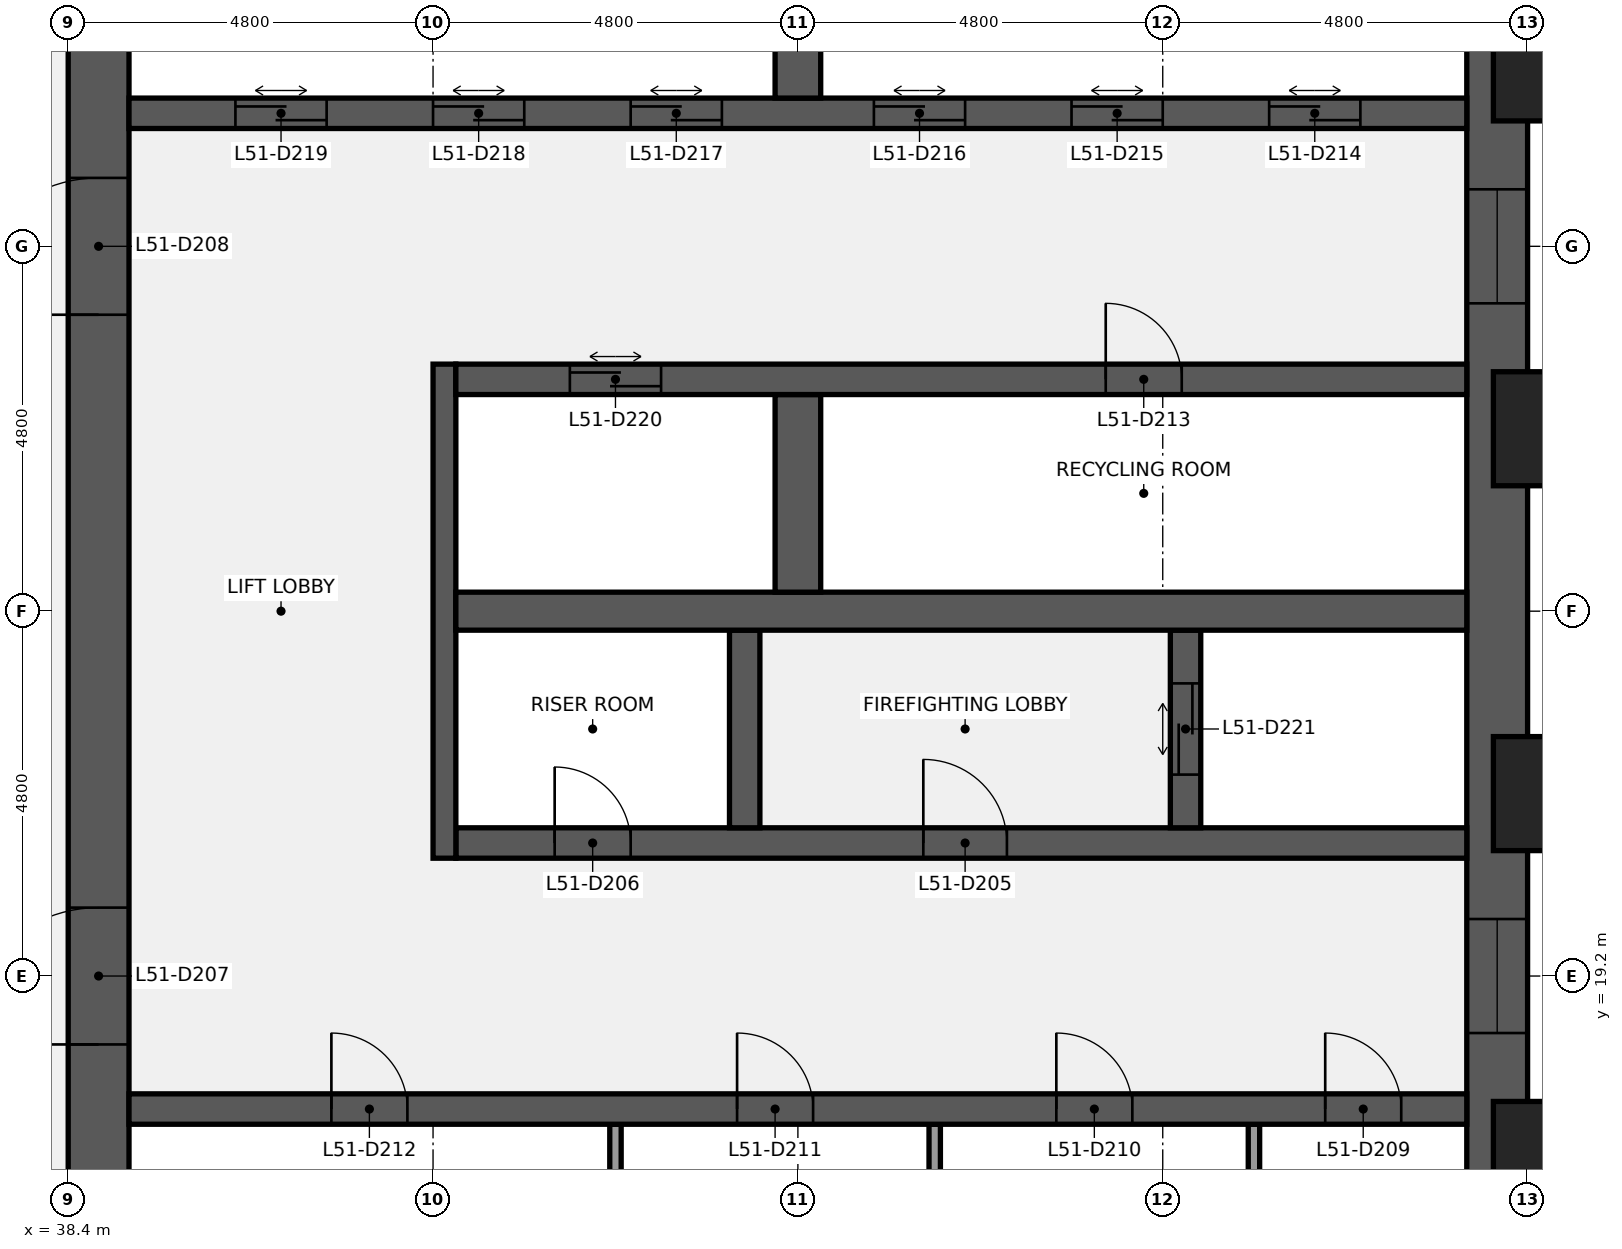
"""IFC4 building model, lengths in metres.
Left out: names, types, materials, properties, quantities, classifications, styles, units other than length and angle.
Written with IfcOpenShell. Run it as: python <this file> out.ifc"""

import sys

from ifc_helpers import new_model, si_unit, direction, frame, frame_2d, origin, origin_2d, place, context, subcontext, project, spatial, rectangle, extrude, element, fill, save


model = new_model("IFC4")
c1 = context("Model", 3, precision=1e-05, world=origin(), true_north=direction((0.0, 1.0)))
c2 = subcontext(c1, "Body", "Model", "MODEL_VIEW")
j1 = project(units=[si_unit("LENGTHUNIT", "METRE"), si_unit("PLANEANGLEUNIT", "RADIAN")], contexts=[c1])
p1 = place(None, origin())
s1 = spatial("IfcSite", under=j1, at=p1, CompositionType="ELEMENT")
p2 = place(p1, origin())
s2 = spatial("IfcBuilding", under=s1, at=p2, CompositionType="ELEMENT")
p3 = place(p2, frame((0.0, 0.0, 233.2)))
s3 = spatial("IfcBuildingStorey", under=s2, at=p3, CompositionType="ELEMENT", Elevation=233.2)
p4 = place(p3, frame((57.2, 38.4, 0.0), z_axis=(0.0, 0.0, 1.0), x_axis=(0.0, -1.0, 0.0)))
e1 = element("IfcWall", 1, at=p4, inside=s3, PredefinedType="SHEAR", context=c2, shape_type="SweptSolid", body=[
    extrude(rectangle(XDim=28.8, YDim=0.8, at=frame_2d((14.4, 0.0))), origin(), (0.0, 0.0, 1.0), 3.84),
])
p5 = place(p4, frame((18.45, 0.0, 0.9)))
e2 = element("IfcOpeningElement", 2, at=p5, cuts=e1, PredefinedType="OPENING", context=c2, shape_type="SweptSolid", body=[
    extrude(rectangle(XDim=1.5, YDim=1.5, at=frame_2d((0.75, 0.75))), frame((0.0, 0.41, 0.0), z_axis=(0.0, -1.0, 0.0), x_axis=(1.0, 0.0, 0.0)), (0.0, 0.0, 1.0), 0.82),
])
p6 = place(p4, frame((8.85, 0.0, 0.9)))
e3 = element("IfcOpeningElement", 3, at=p6, cuts=e1, PredefinedType="OPENING", context=c2, shape_type="SweptSolid", body=[
    extrude(rectangle(XDim=1.5, YDim=1.5, at=frame_2d((0.75, 0.75))), frame((0.0, 0.41, 0.0), z_axis=(0.0, -1.0, 0.0), x_axis=(1.0, 0.0, 0.0)), (0.0, 0.0, 1.0), 0.82),
])
p7 = place(p3, frame((38.8, 9.6, 0.0), z_axis=(0.0, 0.0, 1.0), x_axis=(0.0, 1.0, 0.0)))
e4 = element("IfcWall", 4, at=p7, inside=s3, PredefinedType="SHEAR", context=c2, shape_type="SweptSolid", body=[
    extrude(rectangle(XDim=28.8, YDim=0.8, at=frame_2d((14.4, 0.0))), origin(), (0.0, 0.0, 1.0), 3.84),
])
p8 = place(p7, frame((8.7, 0.0, 0.0)))
e5 = element("IfcOpeningElement", 5, at=p8, cuts=e4, PredefinedType="OPENING", context=c2, shape_type="SweptSolid", body=[
    extrude(rectangle(XDim=1.8, YDim=2.1, at=frame_2d((0.9, 1.05))), frame((0.0, 0.41, 0.0), z_axis=(0.0, -1.0, 0.0), x_axis=(1.0, 0.0, 0.0)), (0.0, 0.0, 1.0), 0.82),
])
p9 = place(p7, frame((18.3, 0.0, 0.0)))
e6 = element("IfcOpeningElement", 6, at=p9, cuts=e4, PredefinedType="OPENING", context=c2, shape_type="SweptSolid", body=[
    extrude(rectangle(XDim=1.8, YDim=2.1, at=frame_2d((0.9, 1.05))), frame((0.0, 0.41, 0.0), z_axis=(0.0, -1.0, 0.0), x_axis=(1.0, 0.0, 0.0)), (0.0, 0.0, 1.0), 0.82),
])
for number, where, z_axis, x_axis in (
    (7, (54.0, 14.65, 0.0), (0.0, 0.0, 1.0), (0.0, 1.0, 0.0)),
    (8, (49.8, 14.65, 0.0), (0.0, 0.0, 1.0), (0.0, 1.0, 0.0)),
    (9, (45.6, 14.65, 0.0), (0.0, 0.0, 1.0), (0.0, 1.0, 0.0)),
):
    element("IfcWall", number, at=place(p3, frame(where, z_axis=z_axis, x_axis=x_axis)), inside=s3, PredefinedType="PARTITIONING", context=c2, shape_type="SweptSolid", body=[
        extrude(rectangle(XDim=2.6, YDim=0.15, at=frame_2d((1.3, 0.0))), origin(), (0.0, 0.0, 1.0), 3.84),
    ])
p10 = place(p3, frame((39.2, 17.45, 0.0), z_axis=(0.0, 0.0, 1.0), x_axis=(1.0, 0.0, 0.0)))
e10 = element("IfcWall", 10, at=p10, inside=s3, PredefinedType="SHEAR", context=c2, shape_type="SweptSolid", body=[
    extrude(rectangle(XDim=17.6, YDim=0.4, at=frame_2d((8.8, 0.0))), origin(), (0.0, 0.0, 1.0), 3.84),
])
p11 = place(p10, frame((15.738, 0.0, 0.0)))
e11 = element("IfcOpeningElement", 11, at=p11, cuts=e10, PredefinedType="OPENING", context=c2, shape_type="SweptSolid", body=[
    extrude(rectangle(XDim=1.0, YDim=2.1, at=frame_2d((0.5, 1.05))), frame((0.0, 0.21, 0.0), z_axis=(0.0, -1.0, 0.0), x_axis=(1.0, 0.0, 0.0)), (0.0, 0.0, 1.0), 0.42),
])
p12 = place(p10, frame((12.2, 0.0, 0.0)))
e12 = element("IfcOpeningElement", 12, at=p12, cuts=e10, PredefinedType="OPENING", context=c2, shape_type="SweptSolid", body=[
    extrude(rectangle(XDim=1.0, YDim=2.1, at=frame_2d((0.5, 1.05))), frame((0.0, 0.21, 0.0), z_axis=(0.0, -1.0, 0.0), x_axis=(1.0, 0.0, 0.0)), (0.0, 0.0, 1.0), 0.42),
])
p13 = place(p10, frame((8.0, 0.0, 0.0)))
e13 = element("IfcOpeningElement", 13, at=p13, cuts=e10, PredefinedType="OPENING", context=c2, shape_type="SweptSolid", body=[
    extrude(rectangle(XDim=1.0, YDim=2.1, at=frame_2d((0.5, 1.05))), frame((0.0, 0.21, 0.0), z_axis=(0.0, -1.0, 0.0), x_axis=(1.0, 0.0, 0.0)), (0.0, 0.0, 1.0), 0.42),
])
p14 = place(p10, frame((2.663, 0.0, 0.0)))
e14 = element("IfcOpeningElement", 14, at=p14, cuts=e10, PredefinedType="OPENING", context=c2, shape_type="SweptSolid", body=[
    extrude(rectangle(XDim=1.0, YDim=2.1, at=frame_2d((0.5, 1.05))), frame((0.0, 0.21, 0.0), z_axis=(0.0, -1.0, 0.0), x_axis=(1.0, 0.0, 0.0)), (0.0, 0.0, 1.0), 0.42),
])
p15 = place(p3, frame((43.5, 20.95, 0.0), z_axis=(0.0, 0.0, 1.0), x_axis=(1.0, 0.0, 0.0)))
e15 = element("IfcWall", 15, at=p15, inside=s3, PredefinedType="SHEAR", context=c2, shape_type="SweptSolid", body=[
    extrude(rectangle(XDim=13.3, YDim=0.4, at=frame_2d((6.65, 0.0))), origin(), (0.0, 0.0, 1.0), 3.84),
])
p16 = place(p15, frame((6.15, 0.0, 0.0)))
e16 = element("IfcOpeningElement", 16, at=p16, cuts=e15, PredefinedType="OPENING", context=c2, shape_type="SweptSolid", body=[
    extrude(rectangle(XDim=1.1, YDim=2.1, at=frame_2d((0.55, 1.05))), frame((0.0, 0.21, 0.0), z_axis=(0.0, -1.0, 0.0), x_axis=(1.0, 0.0, 0.0)), (0.0, 0.0, 1.0), 0.42),
])
p17 = place(p15, frame((1.3, 0.0, 0.0)))
e17 = element("IfcOpeningElement", 17, at=p17, cuts=e15, PredefinedType="OPENING", context=c2, shape_type="SweptSolid", body=[
    extrude(rectangle(XDim=1.0, YDim=2.1, at=frame_2d((0.5, 1.05))), frame((0.0, 0.21, 0.0), z_axis=(0.0, -1.0, 0.0), x_axis=(1.0, 0.0, 0.0)), (0.0, 0.0, 1.0), 0.42),
])
p18 = place(p3, frame((43.35, 20.75, 0.0), z_axis=(0.0, 0.0, 1.0), x_axis=(0.0, 1.0, 0.0)))
e18 = element("IfcWall", 18, at=p18, inside=s3, PredefinedType="SHEAR", context=c2, shape_type="SweptSolid", body=[
    extrude(rectangle(XDim=6.5, YDim=0.3, at=frame_2d((3.25, 0.0))), origin(), (0.0, 0.0, 1.0), 3.84),
])
p19 = place(p3, frame((53.1, 21.15, 0.0), z_axis=(0.0, 0.0, 1.0), x_axis=(0.0, 1.0, 0.0)))
e19 = element("IfcWall", 19, at=p19, inside=s3, PredefinedType="SHEAR", context=c2, shape_type="SweptSolid", body=[
    extrude(rectangle(XDim=2.6, YDim=0.4, at=frame_2d((1.3, 0.0))), origin(), (0.0, 0.0, 1.0), 3.84),
])
p20 = place(p19, frame((0.7, 0.0, 0.0)))
e20 = element("IfcOpeningElement", 20, at=p20, cuts=e19, PredefinedType="OPENING", context=c2, shape_type="SweptSolid", body=[
    extrude(rectangle(XDim=1.2, YDim=2.1, at=frame_2d((0.6, 1.05))), frame((0.0, 0.21, 0.0), z_axis=(0.0, -1.0, 0.0), x_axis=(1.0, 0.0, 0.0)), (0.0, 0.0, 1.0), 0.42),
])
p21 = place(p3, frame((47.3, 21.15, 0.0), z_axis=(0.0, 0.0, 1.0), x_axis=(0.0, 1.0, 0.0)))
e21 = element("IfcWall", 21, at=p21, inside=s3, PredefinedType="SHEAR", context=c2, shape_type="SweptSolid", body=[
    extrude(rectangle(XDim=2.6, YDim=0.4, at=frame_2d((1.3, 0.0))), origin(), (0.0, 0.0, 1.0), 3.84),
])
p22 = place(p3, frame((43.5, 24.0, 0.0), z_axis=(0.0, 0.0, 1.0), x_axis=(1.0, 0.0, 0.0)))
e22 = element("IfcWall", 22, at=p22, inside=s3, PredefinedType="SHEAR", context=c2, shape_type="SweptSolid", body=[
    extrude(rectangle(XDim=13.3, YDim=0.5, at=frame_2d((6.65, 0.0))), origin(), (0.0, 0.0, 1.0), 3.84),
])
p23 = place(p3, frame((48.0, 24.25, 0.0), z_axis=(0.0, 0.0, 1.0), x_axis=(0.0, 1.0, 0.0)))
e23 = element("IfcWall", 23, at=p23, inside=s3, PredefinedType="SHEAR", context=c2, shape_type="SweptSolid", body=[
    extrude(rectangle(XDim=2.6, YDim=0.6, at=frame_2d((1.3, 0.0))), origin(), (0.0, 0.0, 1.0), 3.84),
])
p24 = place(p3, frame((43.5, 27.05, 0.0), z_axis=(0.0, 0.0, 1.0), x_axis=(1.0, 0.0, 0.0)))
e24 = element("IfcWall", 24, at=p24, inside=s3, PredefinedType="SHEAR", context=c2, shape_type="SweptSolid", body=[
    extrude(rectangle(XDim=13.3, YDim=0.4, at=frame_2d((6.65, 0.0))), origin(), (0.0, 0.0, 1.0), 3.84),
])
p25 = place(p24, frame((8.55, 0.0, 0.0)))
e25 = element("IfcOpeningElement", 25, at=p25, cuts=e24, PredefinedType="OPENING", context=c2, shape_type="SweptSolid", body=[
    extrude(rectangle(XDim=1.0, YDim=2.1, at=frame_2d((0.5, 1.05))), frame((0.0, 0.21, 0.0), z_axis=(0.0, -1.0, 0.0), x_axis=(1.0, 0.0, 0.0)), (0.0, 0.0, 1.0), 0.42),
])
p26 = place(p24, frame((1.5, 0.0, 0.0)))
e26 = element("IfcOpeningElement", 26, at=p26, cuts=e24, PredefinedType="OPENING", context=c2, shape_type="SweptSolid", body=[
    extrude(rectangle(XDim=1.2, YDim=2.1, at=frame_2d((0.6, 1.05))), frame((0.0, 0.21, 0.0), z_axis=(0.0, -1.0, 0.0), x_axis=(1.0, 0.0, 0.0)), (0.0, 0.0, 1.0), 0.42),
])
p27 = place(p3, frame((39.2, 30.55, 0.0), z_axis=(0.0, 0.0, 1.0), x_axis=(1.0, 0.0, 0.0)))
e27 = element("IfcWall", 27, at=p27, inside=s3, PredefinedType="SHEAR", context=c2, shape_type="SweptSolid", body=[
    extrude(rectangle(XDim=17.6, YDim=0.4, at=frame_2d((8.8, 0.0))), origin(), (0.0, 0.0, 1.0), 3.84),
])
p28 = place(p27, frame((15.0, 0.0, 0.0)))
e28 = element("IfcOpeningElement", 28, at=p28, cuts=e27, PredefinedType="OPENING", context=c2, shape_type="SweptSolid", body=[
    extrude(rectangle(XDim=1.2, YDim=2.1, at=frame_2d((0.6, 1.05))), frame((0.0, 0.21, 0.0), z_axis=(0.0, -1.0, 0.0), x_axis=(1.0, 0.0, 0.0)), (0.0, 0.0, 1.0), 0.42),
])
p29 = place(p27, frame((12.4, 0.0, 0.0)))
e29 = element("IfcOpeningElement", 29, at=p29, cuts=e27, PredefinedType="OPENING", context=c2, shape_type="SweptSolid", body=[
    extrude(rectangle(XDim=1.2, YDim=2.1, at=frame_2d((0.6, 1.05))), frame((0.0, 0.21, 0.0), z_axis=(0.0, -1.0, 0.0), x_axis=(1.0, 0.0, 0.0)), (0.0, 0.0, 1.0), 0.42),
])
p30 = place(p27, frame((9.8, 0.0, 0.0)))
e30 = element("IfcOpeningElement", 30, at=p30, cuts=e27, PredefinedType="OPENING", context=c2, shape_type="SweptSolid", body=[
    extrude(rectangle(XDim=1.2, YDim=2.1, at=frame_2d((0.6, 1.05))), frame((0.0, 0.21, 0.0), z_axis=(0.0, -1.0, 0.0), x_axis=(1.0, 0.0, 0.0)), (0.0, 0.0, 1.0), 0.42),
])
p31 = place(p27, frame((6.6, 0.0, 0.0)))
e31 = element("IfcOpeningElement", 31, at=p31, cuts=e27, PredefinedType="OPENING", context=c2, shape_type="SweptSolid", body=[
    extrude(rectangle(XDim=1.2, YDim=2.1, at=frame_2d((0.6, 1.05))), frame((0.0, 0.21, 0.0), z_axis=(0.0, -1.0, 0.0), x_axis=(1.0, 0.0, 0.0)), (0.0, 0.0, 1.0), 0.42),
])
p32 = place(p27, frame((4.0, 0.0, 0.0)))
e32 = element("IfcOpeningElement", 32, at=p32, cuts=e27, PredefinedType="OPENING", context=c2, shape_type="SweptSolid", body=[
    extrude(rectangle(XDim=1.2, YDim=2.1, at=frame_2d((0.6, 1.05))), frame((0.0, 0.21, 0.0), z_axis=(0.0, -1.0, 0.0), x_axis=(1.0, 0.0, 0.0)), (0.0, 0.0, 1.0), 0.42),
])
p33 = place(p27, frame((1.4, 0.0, 0.0)))
e33 = element("IfcOpeningElement", 33, at=p33, cuts=e27, PredefinedType="OPENING", context=c2, shape_type="SweptSolid", body=[
    extrude(rectangle(XDim=1.2, YDim=2.1, at=frame_2d((0.6, 1.05))), frame((0.0, 0.21, 0.0), z_axis=(0.0, -1.0, 0.0), x_axis=(1.0, 0.0, 0.0)), (0.0, 0.0, 1.0), 0.42),
])
p34 = place(p3, frame((48.0, 30.75, 0.0), z_axis=(0.0, 0.0, 1.0), x_axis=(0.0, 1.0, 0.0)))
e34 = element("IfcWall", 34, at=p34, inside=s3, PredefinedType="SHEAR", context=c2, shape_type="SweptSolid", body=[
    extrude(rectangle(XDim=2.6, YDim=0.6, at=frame_2d((1.3, 0.0))), origin(), (0.0, 0.0, 1.0), 3.84),
])
for number, where, z_axis, x_axis in (
    (35, (58.35, 16.8, 0.0), (0.0, 0.0, 1.0), (0.0, 1.0, 0.0)),
    (36, (58.35, 21.6, 0.0), (0.0, 0.0, 1.0), (0.0, 1.0, 0.0)),
    (37, (58.35, 26.4, 0.0), (0.0, 0.0, 1.0), (0.0, 1.0, 0.0)),
    (38, (58.35, 31.2, 0.0), (0.0, 0.0, 1.0), (0.0, 1.0, 0.0)),
):
    element("IfcColumn", number, at=place(p3, frame(where, z_axis=z_axis, x_axis=x_axis)), inside=s3, PredefinedType="PILASTER", context=c2, shape_type="SweptSolid", body=[
        extrude(rectangle(XDim=2.4, YDim=1.5, at=origin_2d()), origin(), (0.0, 0.0, 1.0), 4.0),
    ])
p35 = place(p16, origin())
e39 = element("IfcDoor", 39, at=p35, inside=s3, OperationType="SINGLE_SWING_LEFT", PredefinedType="DOOR", context=c2, shape_type="SweptSolid", body=[
    extrude(rectangle(XDim=1.1, YDim=2.1, at=frame_2d((0.55, 1.05))), frame((0.0, 0.025, 0.0), z_axis=(0.0, -1.0, 0.0), x_axis=(1.0, 0.0, 0.0)), (0.0, 0.0, 1.0), 0.05),
])
fill(e16, e39)
p36 = place(p17, origin())
e40 = element("IfcDoor", 40, at=p36, inside=s3, OperationType="SINGLE_SWING_LEFT", PredefinedType="DOOR", context=c2, shape_type="SweptSolid", body=[
    extrude(rectangle(XDim=1.0, YDim=2.1, at=frame_2d((0.5, 1.05))), frame((0.0, 0.025, 0.0), z_axis=(0.0, -1.0, 0.0), x_axis=(1.0, 0.0, 0.0)), (0.0, 0.0, 1.0), 0.05),
])
fill(e17, e40)
p37 = place(p8, origin())
e41 = element("IfcDoor", 41, at=p37, inside=s3, OperationType="DOUBLE_DOOR_SINGLE_SWING", PredefinedType="DOOR", context=c2, shape_type="SweptSolid", body=[
    extrude(rectangle(XDim=1.8, YDim=2.1, at=frame_2d((0.9, 1.05))), frame((0.0, 0.025, 0.0), z_axis=(0.0, -1.0, 0.0), x_axis=(1.0, 0.0, 0.0)), (0.0, 0.0, 1.0), 0.05),
])
fill(e5, e41)
p38 = place(p9, origin())
e42 = element("IfcDoor", 42, at=p38, inside=s3, OperationType="DOUBLE_DOOR_SINGLE_SWING", PredefinedType="DOOR", context=c2, shape_type="SweptSolid", body=[
    extrude(rectangle(XDim=1.8, YDim=2.1, at=frame_2d((0.9, 1.05))), frame((0.0, 0.025, 0.0), z_axis=(0.0, -1.0, 0.0), x_axis=(1.0, 0.0, 0.0)), (0.0, 0.0, 1.0), 0.05),
])
fill(e6, e42)
p39 = place(p11, origin())
e43 = element("IfcDoor", 43, at=p39, inside=s3, OperationType="SINGLE_SWING_LEFT", PredefinedType="DOOR", context=c2, shape_type="SweptSolid", body=[
    extrude(rectangle(XDim=1.0, YDim=2.1, at=frame_2d((0.5, 1.05))), frame((0.0, 0.025, 0.0), z_axis=(0.0, -1.0, 0.0), x_axis=(1.0, 0.0, 0.0)), (0.0, 0.0, 1.0), 0.05),
])
fill(e11, e43)
p40 = place(p12, origin())
e44 = element("IfcDoor", 44, at=p40, inside=s3, OperationType="SINGLE_SWING_LEFT", PredefinedType="DOOR", context=c2, shape_type="SweptSolid", body=[
    extrude(rectangle(XDim=1.0, YDim=2.1, at=frame_2d((0.5, 1.05))), frame((0.0, 0.025, 0.0), z_axis=(0.0, -1.0, 0.0), x_axis=(1.0, 0.0, 0.0)), (0.0, 0.0, 1.0), 0.05),
])
fill(e12, e44)
p41 = place(p13, origin())
e45 = element("IfcDoor", 45, at=p41, inside=s3, OperationType="SINGLE_SWING_LEFT", PredefinedType="DOOR", context=c2, shape_type="SweptSolid", body=[
    extrude(rectangle(XDim=1.0, YDim=2.1, at=frame_2d((0.5, 1.05))), frame((0.0, 0.025, 0.0), z_axis=(0.0, -1.0, 0.0), x_axis=(1.0, 0.0, 0.0)), (0.0, 0.0, 1.0), 0.05),
])
fill(e13, e45)
p42 = place(p14, origin())
e46 = element("IfcDoor", 46, at=p42, inside=s3, OperationType="SINGLE_SWING_LEFT", PredefinedType="DOOR", context=c2, shape_type="SweptSolid", body=[
    extrude(rectangle(XDim=1.0, YDim=2.1, at=frame_2d((0.5, 1.05))), frame((0.0, 0.025, 0.0), z_axis=(0.0, -1.0, 0.0), x_axis=(1.0, 0.0, 0.0)), (0.0, 0.0, 1.0), 0.05),
])
fill(e14, e46)
p43 = place(p25, origin())
e47 = element("IfcDoor", 47, at=p43, inside=s3, OperationType="SINGLE_SWING_LEFT", PredefinedType="DOOR", context=c2, shape_type="SweptSolid", body=[
    extrude(rectangle(XDim=1.0, YDim=2.1, at=frame_2d((0.5, 1.05))), frame((0.0, 0.025, 0.0), z_axis=(0.0, -1.0, 0.0), x_axis=(1.0, 0.0, 0.0)), (0.0, 0.0, 1.0), 0.05),
])
fill(e25, e47)
p44 = place(p28, origin())
e48 = element("IfcDoor", 48, at=p44, inside=s3, OperationType="DOUBLE_DOOR_SLIDING", PredefinedType="DOOR", context=c2, shape_type="SweptSolid", body=[
    extrude(rectangle(XDim=1.2, YDim=2.1, at=frame_2d((0.6, 1.05))), frame((0.0, 0.025, 0.0), z_axis=(0.0, -1.0, 0.0), x_axis=(1.0, 0.0, 0.0)), (0.0, 0.0, 1.0), 0.05),
])
fill(e28, e48)
p45 = place(p29, origin())
e49 = element("IfcDoor", 49, at=p45, inside=s3, OperationType="DOUBLE_DOOR_SLIDING", PredefinedType="DOOR", context=c2, shape_type="SweptSolid", body=[
    extrude(rectangle(XDim=1.2, YDim=2.1, at=frame_2d((0.6, 1.05))), frame((0.0, 0.025, 0.0), z_axis=(0.0, -1.0, 0.0), x_axis=(1.0, 0.0, 0.0)), (0.0, 0.0, 1.0), 0.05),
])
fill(e29, e49)
p46 = place(p30, origin())
e50 = element("IfcDoor", 50, at=p46, inside=s3, OperationType="DOUBLE_DOOR_SLIDING", PredefinedType="DOOR", context=c2, shape_type="SweptSolid", body=[
    extrude(rectangle(XDim=1.2, YDim=2.1, at=frame_2d((0.6, 1.05))), frame((0.0, 0.025, 0.0), z_axis=(0.0, -1.0, 0.0), x_axis=(1.0, 0.0, 0.0)), (0.0, 0.0, 1.0), 0.05),
])
fill(e30, e50)
p47 = place(p31, origin())
e51 = element("IfcDoor", 51, at=p47, inside=s3, OperationType="DOUBLE_DOOR_SLIDING", PredefinedType="DOOR", context=c2, shape_type="SweptSolid", body=[
    extrude(rectangle(XDim=1.2, YDim=2.1, at=frame_2d((0.6, 1.05))), frame((0.0, 0.025, 0.0), z_axis=(0.0, -1.0, 0.0), x_axis=(1.0, 0.0, 0.0)), (0.0, 0.0, 1.0), 0.05),
])
fill(e31, e51)
p48 = place(p32, origin())
e52 = element("IfcDoor", 52, at=p48, inside=s3, OperationType="DOUBLE_DOOR_SLIDING", PredefinedType="DOOR", context=c2, shape_type="SweptSolid", body=[
    extrude(rectangle(XDim=1.2, YDim=2.1, at=frame_2d((0.6, 1.05))), frame((0.0, 0.025, 0.0), z_axis=(0.0, -1.0, 0.0), x_axis=(1.0, 0.0, 0.0)), (0.0, 0.0, 1.0), 0.05),
])
fill(e32, e52)
p49 = place(p33, origin())
e53 = element("IfcDoor", 53, at=p49, inside=s3, OperationType="DOUBLE_DOOR_SLIDING", PredefinedType="DOOR", context=c2, shape_type="SweptSolid", body=[
    extrude(rectangle(XDim=1.2, YDim=2.1, at=frame_2d((0.6, 1.05))), frame((0.0, 0.025, 0.0), z_axis=(0.0, -1.0, 0.0), x_axis=(1.0, 0.0, 0.0)), (0.0, 0.0, 1.0), 0.05),
])
fill(e33, e53)
p50 = place(p26, origin())
e54 = element("IfcDoor", 54, at=p50, inside=s3, OperationType="DOUBLE_DOOR_SLIDING", PredefinedType="DOOR", context=c2, shape_type="SweptSolid", body=[
    extrude(rectangle(XDim=1.2, YDim=2.1, at=frame_2d((0.6, 1.05))), frame((0.0, 0.025, 0.0), z_axis=(0.0, -1.0, 0.0), x_axis=(1.0, 0.0, 0.0)), (0.0, 0.0, 1.0), 0.05),
])
fill(e26, e54)
p51 = place(p20, origin())
e55 = element("IfcDoor", 55, at=p51, inside=s3, OperationType="DOUBLE_DOOR_SLIDING", PredefinedType="DOOR", context=c2, shape_type="SweptSolid", body=[
    extrude(rectangle(XDim=1.2, YDim=2.1, at=frame_2d((0.6, 1.05))), frame((0.0, 0.025, 0.0), z_axis=(0.0, -1.0, 0.0), x_axis=(1.0, 0.0, 0.0)), (0.0, 0.0, 1.0), 0.05),
])
fill(e20, e55)
p52 = place(p5, origin())
e56 = element("IfcWindow", 56, at=p52, inside=s3, PartitioningType="SINGLE_PANEL", PredefinedType="WINDOW", context=c2, shape_type="SweptSolid", body=[
    extrude(rectangle(XDim=1.5, YDim=1.5, at=frame_2d((0.75, 0.75))), frame((0.0, 0.03, 0.0), z_axis=(0.0, -1.0, 0.0), x_axis=(1.0, 0.0, 0.0)), (0.0, 0.0, 1.0), 0.06),
])
fill(e2, e56)
p53 = place(p6, origin())
e57 = element("IfcWindow", 57, at=p53, inside=s3, PartitioningType="SINGLE_PANEL", PredefinedType="WINDOW", context=c2, shape_type="SweptSolid", body=[
    extrude(rectangle(XDim=1.5, YDim=1.5, at=frame_2d((0.75, 0.75))), frame((0.0, 0.03, 0.0), z_axis=(0.0, -1.0, 0.0), x_axis=(1.0, 0.0, 0.0)), (0.0, 0.0, 1.0), 0.06),
])
fill(e3, e57)
save(model, sys.argv[1])
